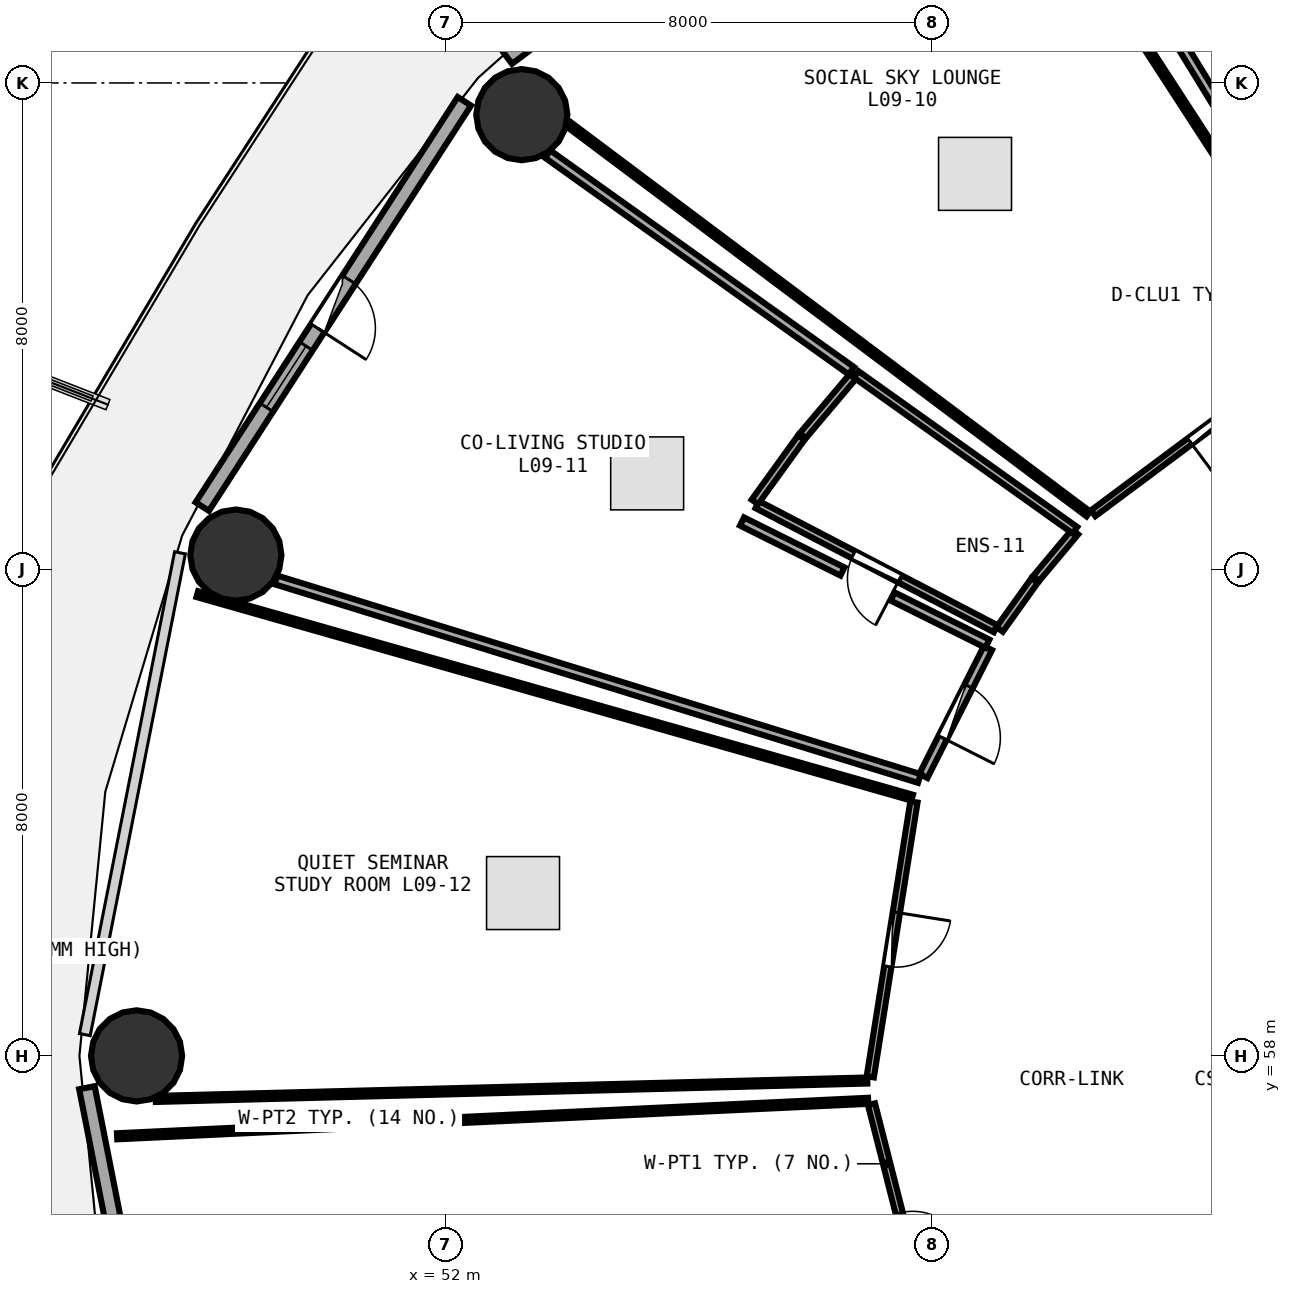
"""IFC4 building model, lengths in metres.
Left out: names, types, materials, properties, quantities, classifications, styles, units other than length and angle.
Written with IfcOpenShell. Run it as: python <this file> out.ifc"""

import sys

from ifc_helpers import new_model, si_unit, direction, frame, frame_2d, origin, origin_2d, place, context, subcontext, project, spatial, rectangle, circle, extrude, element, fill, save


model = new_model("IFC4")
c1 = context("Model", 3, precision=1e-05, world=origin(), true_north=direction((0.0, 1.0)))
c2 = subcontext(c1, "Body", "Model", "MODEL_VIEW")
j1 = project(units=[si_unit("LENGTHUNIT", "METRE"), si_unit("PLANEANGLEUNIT", "RADIAN")], contexts=[c1])
p1 = place(None, origin())
s1 = spatial("IfcSite", under=j1, at=p1, CompositionType="ELEMENT")
p2 = place(p1, origin())
s2 = spatial("IfcBuilding", under=s1, at=p2, CompositionType="ELEMENT")
p3 = place(p2, frame((0.0, 0.0, 37.5)))
s3 = spatial("IfcBuildingStorey", under=s2, at=p3, CompositionType="ELEMENT", Elevation=37.5)
for number, where, z_axis, x_axis in (
    (1, (53.256, 73.478, 0.0), (0.0, 0.0, 1.0), (1.0, 0.0, 0.0)),
    (2, (48.553, 66.236, 0.0), (0.0, 0.0, 1.0), (1.0, 0.0, 0.0)),
    (3, (46.92, 58.0, 0.0), (0.0, 0.0, 1.0), (1.0, 0.0, 0.0)),
):
    element("IfcColumn", number, at=place(p3, frame(where, z_axis=z_axis, x_axis=x_axis)), inside=s3, PredefinedType="COLUMN", context=c2, shape_type="SweptSolid", body=[
        extrude(circle(Radius=0.75, at=origin_2d()), origin(), (0.0, 0.0, 1.0), 3.75),
    ])
p4 = place(p3, frame((59.651, 79.389, 0.0), z_axis=(0.0, 0.0, 1.0), x_axis=(-0.80030733173, -0.599590005569, 0.0)))
e4 = element("IfcWall", 4, at=p4, inside=s3, PredefinedType="SOLIDWALL", context=c2, shape_type="SweptSolid", body=[
    extrude(rectangle(XDim=8.291, YDim=0.26, at=frame_2d((4.145, 0.0))), origin(), (0.0, 0.0, 1.0), 3.475),
])
p5 = place(p4, frame((3.345, 0.0, 0.85)))
e5 = element("IfcOpeningElement", 5, at=p5, cuts=e4, PredefinedType="OPENING", context=c2, shape_type="SweptSolid", body=[
    extrude(rectangle(XDim=1.6, YDim=1.45, at=frame_2d((0.8, 0.725))), frame((0.0, 0.14, 0.0), z_axis=(0.0, -1.0, 0.0), x_axis=(1.0, 0.0, 0.0)), (0.0, 0.0, 1.0), 0.28),
])
p6 = place(p3, frame((52.311, 73.698, 0.0), z_axis=(0.0, 0.0, 1.0), x_axis=(-0.543005114258, -0.839729388488, 0.0)))
e6 = element("IfcWall", 6, at=p6, inside=s3, PredefinedType="SOLIDWALL", context=c2, shape_type="SweptSolid", body=[
    extrude(rectangle(XDim=7.938, YDim=0.26, at=frame_2d((3.969, 0.0))), origin(), (0.0, 0.0, 1.0), 3.475),
])
p7 = place(p6, frame((3.494, 0.0, 0.0)))
e7 = element("IfcOpeningElement", 7, at=p7, cuts=e6, PredefinedType="OPENING", context=c2, shape_type="SweptSolid", body=[
    extrude(rectangle(XDim=0.95, YDim=2.1, at=frame_2d((0.475, 1.05))), frame((0.0, 0.14, 0.0), z_axis=(0.0, -1.0, 0.0), x_axis=(1.0, 0.0, 0.0)), (0.0, 0.0, 1.0), 0.28),
])
p8 = place(p6, frame((4.794, 0.0, 0.85)))
e8 = element("IfcOpeningElement", 8, at=p8, cuts=e6, PredefinedType="OPENING", context=c2, shape_type="SweptSolid", body=[
    extrude(rectangle(XDim=1.2, YDim=1.45, at=frame_2d((0.6, 0.725))), frame((0.0, 0.14, 0.0), z_axis=(0.0, -1.0, 0.0), x_axis=(1.0, 0.0, 0.0)), (0.0, 0.0, 1.0), 0.28),
])
p9 = place(p3, frame((46.104, 57.477, 0.0), z_axis=(0.0, 0.0, 1.0), x_axis=(0.193726159581, -0.98105564322, 0.0)))
e9 = element("IfcWall", 9, at=p9, inside=s3, PredefinedType="SOLIDWALL", context=c2, shape_type="SweptSolid", body=[
    extrude(rectangle(XDim=7.703, YDim=0.26, at=frame_2d((3.851, 0.0))), origin(), (0.0, 0.0, 1.0), 3.475),
])
p10 = place(p9, frame((3.051, 0.0, 0.85)))
e10 = element("IfcOpeningElement", 10, at=p10, cuts=e9, PredefinedType="OPENING", context=c2, shape_type="SweptSolid", body=[
    extrude(rectangle(XDim=1.6, YDim=1.45, at=frame_2d((0.8, 0.725))), frame((0.0, 0.14, 0.0), z_axis=(0.0, -1.0, 0.0), x_axis=(1.0, 0.0, 0.0)), (0.0, 0.0, 1.0), 0.28),
])
p11 = place(p3, frame((66.551, 69.827, 0.0), z_axis=(0.0, 0.0, 1.0), x_axis=(-0.801966818386, -0.597368581537, 0.0)))
e11 = element("IfcWall", 11, at=p11, inside=s3, PredefinedType="PARTITIONING", context=c2, shape_type="SweptSolid", body=[
    extrude(rectangle(XDim=4.86, YDim=0.12, at=frame_2d((2.43, 0.0))), origin(), (0.0, 0.0, 1.0), 2.875),
])
p12 = place(p11, frame((1.98, 0.0, 0.0)))
e12 = element("IfcOpeningElement", 12, at=p12, cuts=e11, PredefinedType="OPENING", context=c2, shape_type="SweptSolid", body=[
    extrude(rectangle(XDim=0.9, YDim=2.08, at=frame_2d((0.45, 1.04))), frame((0.0, 0.07, 0.0), z_axis=(0.0, -1.0, 0.0), x_axis=(1.0, 0.0, 0.0)), (0.0, 0.0, 1.0), 0.14),
])
p13 = place(p3, frame((61.049, 65.025, 0.0), z_axis=(0.0, 0.0, 1.0), x_axis=(-0.887004135063, 0.461761479966, 0.0)))
e13 = element("IfcWall", 13, at=p13, inside=s3, PredefinedType="PLUMBINGWALL", context=c2, shape_type="SweptSolid", body=[
    extrude(rectangle(XDim=4.419, YDim=0.13, at=frame_2d((2.209, 0.0))), origin(), (0.0, 0.0, 1.0), 2.875),
])
p14 = place(p13, frame((1.779, 0.0, 0.0)))
e14 = element("IfcOpeningElement", 14, at=p14, cuts=e13, PredefinedType="OPENING", context=c2, shape_type="SweptSolid", body=[
    extrude(rectangle(XDim=0.86, YDim=2.05, at=frame_2d((0.43, 1.025))), frame((0.0, 0.075, 0.0), z_axis=(0.0, -1.0, 0.0), x_axis=(1.0, 0.0, 0.0)), (0.0, 0.0, 1.0), 0.15),
])
p15 = place(p3, frame((60.922, 64.708, 0.0), z_axis=(0.0, 0.0, 1.0), x_axis=(-0.45085566933, -0.892596866135, 0.0)))
e15 = element("IfcWall", 15, at=p15, inside=s3, PredefinedType="PARTITIONING", context=c2, shape_type="SweptSolid", body=[
    extrude(rectangle(XDim=2.357, YDim=0.15, at=frame_2d((1.179, 0.0))), origin(), (0.0, 0.0, 1.0), 3.48),
])
p16 = place(p15, frame((0.704, 0.0, 0.0)))
e16 = element("IfcOpeningElement", 16, at=p16, cuts=e15, PredefinedType="OPENING", context=c2, shape_type="SweptSolid", body=[
    extrude(rectangle(XDim=0.95, YDim=2.08, at=frame_2d((0.475, 1.04))), frame((0.0, 0.085, 0.0), z_axis=(0.0, -1.0, 0.0), x_axis=(1.0, 0.0, 0.0)), (0.0, 0.0, 1.0), 0.17),
])
p17 = place(p3, frame((59.705, 62.176, 0.0), z_axis=(0.0, 0.0, 1.0), x_axis=(-0.156921147042, -0.987611134815, 0.0)))
e17 = element("IfcWall", 17, at=p17, inside=s3, PredefinedType="PARTITIONING", context=c2, shape_type="SweptSolid", body=[
    extrude(rectangle(XDim=4.577, YDim=0.12, at=frame_2d((2.289, 0.0))), origin(), (0.0, 0.0, 1.0), 2.875),
])
p18 = place(p17, frame((1.839, 0.0, 0.0)))
e18 = element("IfcOpeningElement", 18, at=p18, cuts=e17, PredefinedType="OPENING", context=c2, shape_type="SweptSolid", body=[
    extrude(rectangle(XDim=0.9, YDim=2.08, at=frame_2d((0.45, 1.04))), frame((0.0, 0.07, 0.0), z_axis=(0.0, -1.0, 0.0), x_axis=(1.0, 0.0, 0.0)), (0.0, 0.0, 1.0), 0.14),
])
p19 = place(p3, frame((59.007, 57.205, 0.0), z_axis=(0.0, 0.0, 1.0), x_axis=(0.24676097294, -0.969076375852, 0.0)))
e19 = element("IfcWall", 19, at=p19, inside=s3, PredefinedType="PARTITIONING", context=c2, shape_type="SweptSolid", body=[
    extrude(rectangle(XDim=4.593, YDim=0.12, at=frame_2d((2.296, 0.0))), origin(), (0.0, 0.0, 1.0), 3.48),
])
p20 = place(p19, frame((1.846, 0.0, 0.0)))
e20 = element("IfcOpeningElement", 20, at=p20, cuts=e19, PredefinedType="OPENING", context=c2, shape_type="SweptSolid", body=[
    extrude(rectangle(XDim=0.9, YDim=2.08, at=frame_2d((0.45, 1.04))), frame((0.0, 0.07, 0.0), z_axis=(0.0, -1.0, 0.0), x_axis=(1.0, 0.0, 0.0)), (0.0, 0.0, 1.0), 0.14),
])
p21 = place(p3, frame((66.9, 70.057, 0.0), z_axis=(0.0, 0.0, 1.0), x_axis=(-0.522434140672, 0.852679640111, 0.0)))
e21 = element("IfcWall", 21, at=p21, inside=s3, PredefinedType="PARTITIONING", context=c2, shape_type="SweptSolid", body=[
    extrude(rectangle(XDim=11.145, YDim=0.15, at=frame_2d((5.572, 0.0))), origin(), (0.0, 0.0, 1.0), 2.875),
])
p22 = place(p3, frame((62.573, 66.912, 0.0), z_axis=(0.0, 0.0, 1.0), x_axis=(-0.800175286691, 0.599766213261, 0.0)))
e22 = element("IfcWall", 22, at=p22, inside=s3, PredefinedType="PARTITIONING", context=c2, shape_type="SweptSolid", body=[
    extrude(rectangle(XDim=10.695, YDim=0.1, at=frame_2d((5.347, 0.0))), origin(), (0.0, 0.0, 1.0), 2.875),
])
p23 = place(p3, frame((61.071, 78.377, 0.0), z_axis=(0.0, 0.0, 1.0), x_axis=(0.544546108356, -0.838730907904, 0.0)))
e23 = element("IfcWall", 23, at=p23, inside=s3, PredefinedType="PARTITIONING", context=c2, shape_type="SweptSolid", body=[
    extrude(rectangle(XDim=10.111, YDim=0.1, at=frame_2d((5.056, 0.0))), origin(), (0.0, 0.0, 1.0), 3.175),
])
p24 = place(p3, frame((62.356, 66.618, 0.0), z_axis=(0.0, 0.0, 1.0), x_axis=(-0.641793013208, -0.766877909577, 0.0)))
e24 = element("IfcWall", 24, at=p24, inside=s3, PredefinedType="PLUMBINGWALL", context=c2, shape_type="SweptSolid", body=[
    extrude(rectangle(XDim=0.999, YDim=0.13, at=frame_2d((0.5, 0.0))), origin(), (0.0, 0.0, 1.0), 3.48),
])
p25 = place(p3, frame((61.69, 65.82, 0.0), z_axis=(0.0, 0.0, 1.0), x_axis=(-0.581843627684, -0.813300678054, 0.0)))
e25 = element("IfcWall", 25, at=p25, inside=s3, PredefinedType="PLUMBINGWALL", context=c2, shape_type="SweptSolid", body=[
    extrude(rectangle(XDim=0.991, YDim=0.13, at=frame_2d((0.496, 0.0))), origin(), (0.0, 0.0, 1.0), 2.875),
])
p26 = place(p3, frame((57.088, 67.109, 0.0), z_axis=(0.0, 0.0, 1.0), x_axis=(0.585545160258, 0.810639787636, 0.0)))
e26 = element("IfcWall", 26, at=p26, inside=s3, PredefinedType="PLUMBINGWALL", context=c2, shape_type="SweptSolid", body=[
    extrude(rectangle(XDim=1.306, YDim=0.13, at=frame_2d((0.653, 0.0))), origin(), (0.0, 0.0, 1.0), 3.48),
])
p27 = place(p3, frame((57.877, 68.199, 0.0), z_axis=(0.0, 0.0, 1.0), x_axis=(0.645609332361, 0.763667853172, 0.0)))
e27 = element("IfcWall", 27, at=p27, inside=s3, PredefinedType="PLUMBINGWALL", context=c2, shape_type="SweptSolid", body=[
    extrude(rectangle(XDim=1.315, YDim=0.13, at=frame_2d((0.658, 0.0))), origin(), (0.0, 0.0, 1.0), 3.48),
])
p28 = place(p3, frame((58.755, 69.208, 0.0), z_axis=(0.0, 0.0, 1.0), x_axis=(0.814438714594, -0.580249584378, 0.0)))
e28 = element("IfcWall", 28, at=p28, inside=s3, PredefinedType="PLUMBINGWALL", context=c2, shape_type="SweptSolid", body=[
    extrude(rectangle(XDim=4.417, YDim=0.13, at=frame_2d((2.208, 0.0))), origin(), (0.0, 0.0, 1.0), 3.235),
])
p29 = place(p3, frame((59.794, 62.562, 0.0), z_axis=(0.0, 0.0, 1.0), x_axis=(-0.955526502323, 0.294905244712, 0.0)))
e29 = element("IfcWall", 29, at=p29, inside=s3, PredefinedType="PARTITIONING", context=c2, shape_type="SweptSolid", body=[
    extrude(rectangle(XDim=11.074, YDim=0.15, at=frame_2d((5.537, 0.0))), origin(), (0.0, 0.0, 1.0), 3.175),
])
p30 = place(p3, frame((53.681, 72.83, 0.0), z_axis=(0.0, 0.0, 1.0), x_axis=(0.81406941819, -0.580767580335, 0.0)))
e30 = element("IfcWall", 30, at=p30, inside=s3, PredefinedType="PARTITIONING", context=c2, shape_type="SweptSolid", body=[
    extrude(rectangle(XDim=6.135, YDim=0.15, at=frame_2d((3.068, 0.0))), origin(), (0.0, 0.0, 1.0), 3.175),
])
p31 = place(p3, frame((56.877, 66.788, 0.0), z_axis=(0.0, 0.0, 1.0), x_axis=(0.895219183004, -0.445626092573, 0.0)))
e31 = element("IfcWall", 31, at=p31, inside=s3, PredefinedType="PARTITIONING", context=c2, shape_type="SweptSolid", body=[
    extrude(rectangle(XDim=1.846, YDim=0.15, at=frame_2d((0.923, 0.0))), origin(), (0.0, 0.0, 1.0), 3.48),
])
p32 = place(p3, frame((59.353, 65.555, 0.0), z_axis=(0.0, 0.0, 1.0), x_axis=(0.895182521617, -0.445699734116, 0.0)))
e32 = element("IfcWall", 32, at=p32, inside=s3, PredefinedType="PARTITIONING", context=c2, shape_type="SweptSolid", body=[
    extrude(rectangle(XDim=1.742, YDim=0.15, at=frame_2d((0.871, 0.0))), origin(), (0.0, 0.0, 1.0), 2.875),
])
p33 = place(p3, frame((58.937, 57.595, 0.0), z_axis=(0.0, 0.0, 1.0), x_axis=(-0.999665498024, -0.025862947642, 0.0)))
e33 = element("IfcWall", 33, at=p33, inside=s3, PredefinedType="PARTITIONING", context=c2, shape_type="SweptSolid", body=[
    extrude(rectangle(XDim=11.705, YDim=0.1, at=frame_2d((5.853, 0.0))), origin(), (0.0, 0.0, 1.0), 2.875),
])
p34 = place(p3, frame((47.918, 65.594, 0.0), z_axis=(0.0, 0.0, 1.0), x_axis=(0.961766996246, -0.273869028792, 0.0)))
e34 = element("IfcWall", 34, at=p34, inside=s3, PredefinedType="PARTITIONING", context=c2, shape_type="SweptSolid", body=[
    extrude(rectangle(XDim=12.224, YDim=0.1, at=frame_2d((6.112, 0.0))), origin(), (0.0, 0.0, 1.0), 2.875),
])
p35 = place(p3, frame((46.6, 56.678, 0.0), z_axis=(0.0, 0.0, 1.0), x_axis=(0.998887928108, 0.04714771554, 0.0)))
e35 = element("IfcWall", 35, at=p35, inside=s3, PredefinedType="PARTITIONING", context=c2, shape_type="SweptSolid", body=[
    extrude(rectangle(XDim=12.365, YDim=0.1, at=frame_2d((6.183, 0.0))), origin(), (0.0, 0.0, 1.0), 2.875),
])
p36 = place(p7, frame((0.95, 0.0, 0.0), z_axis=(0.0, 0.0, 1.0), x_axis=(-1.0, 0.0, 0.0)))
e36 = element("IfcDoor", 36, at=p36, inside=s3, OperationType="SINGLE_SWING_LEFT", PredefinedType="DOOR", context=c2, shape_type="SweptSolid", body=[
    extrude(rectangle(XDim=0.95, YDim=2.1, at=frame_2d((0.475, 1.05))), frame((0.0, 0.025, 0.0), z_axis=(0.0, -1.0, 0.0), x_axis=(1.0, 0.0, 0.0)), (0.0, 0.0, 1.0), 0.05),
])
fill(e7, e36)
p37 = place(p8, origin())
e37 = element("IfcWindow", 37, at=p37, inside=s3, PartitioningType="SINGLE_PANEL", PredefinedType="WINDOW", context=c2, shape_type="SweptSolid", body=[
    extrude(rectangle(XDim=1.2, YDim=1.45, at=frame_2d((0.6, 0.725))), frame((0.0, 0.03, 0.0), z_axis=(0.0, -1.0, 0.0), x_axis=(1.0, 0.0, 0.0)), (0.0, 0.0, 1.0), 0.06),
])
fill(e8, e37)
p38 = place(p12, origin())
e38 = element("IfcDoor", 38, at=p38, inside=s3, OperationType="SINGLE_SWING_RIGHT", PredefinedType="DOOR", context=c2, shape_type="SweptSolid", body=[
    extrude(rectangle(XDim=0.9, YDim=2.08, at=frame_2d((0.45, 1.04))), frame((0.0, 0.025, 0.0), z_axis=(0.0, -1.0, 0.0), x_axis=(1.0, 0.0, 0.0)), (0.0, 0.0, 1.0), 0.05),
])
fill(e12, e38)
p39 = place(p14, origin())
e39 = element("IfcDoor", 39, at=p39, inside=s3, OperationType="SINGLE_SWING_LEFT", PredefinedType="DOOR", context=c2, shape_type="SweptSolid", body=[
    extrude(rectangle(XDim=0.86, YDim=2.05, at=frame_2d((0.43, 1.025))), frame((0.0, 0.025, 0.0), z_axis=(0.0, -1.0, 0.0), x_axis=(1.0, 0.0, 0.0)), (0.0, 0.0, 1.0), 0.05),
])
fill(e14, e39)
p40 = place(p16, origin())
e40 = element("IfcDoor", 40, at=p40, inside=s3, OperationType="SINGLE_SWING_RIGHT", PredefinedType="DOOR", context=c2, shape_type="SweptSolid", body=[
    extrude(rectangle(XDim=0.95, YDim=2.08, at=frame_2d((0.475, 1.04))), frame((0.0, 0.025, 0.0), z_axis=(0.0, -1.0, 0.0), x_axis=(1.0, 0.0, 0.0)), (0.0, 0.0, 1.0), 0.05),
])
fill(e16, e40)
p41 = place(p18, origin())
e41 = element("IfcDoor", 41, at=p41, inside=s3, OperationType="SINGLE_SWING_LEFT", PredefinedType="DOOR", context=c2, shape_type="SweptSolid", body=[
    extrude(rectangle(XDim=0.9, YDim=2.08, at=frame_2d((0.45, 1.04))), frame((0.0, 0.025, 0.0), z_axis=(0.0, -1.0, 0.0), x_axis=(1.0, 0.0, 0.0)), (0.0, 0.0, 1.0), 0.05),
])
fill(e18, e41)
p42 = place(p20, origin())
e42 = element("IfcDoor", 42, at=p42, inside=s3, OperationType="SINGLE_SWING_RIGHT", PredefinedType="DOOR", context=c2, shape_type="SweptSolid", body=[
    extrude(rectangle(XDim=0.9, YDim=2.08, at=frame_2d((0.45, 1.04))), frame((0.0, 0.025, 0.0), z_axis=(0.0, -1.0, 0.0), x_axis=(1.0, 0.0, 0.0)), (0.0, 0.0, 1.0), 0.05),
])
fill(e20, e42)
save(model, sys.argv[1])
